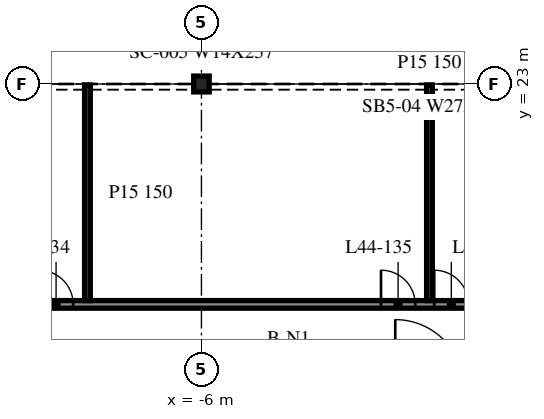
"""IFC4 building model, lengths in metres.
Left out: names, types, materials, properties, quantities, classifications, styles, units other than length and angle.
Written with IfcOpenShell. Run it as: python <this file> out.ifc"""

import sys

from ifc_helpers import new_model, si_unit, direction, frame, frame_2d, origin, origin_2d, place, context, subcontext, project, spatial, rectangle, i_section, extrude, element, fill, save


model = new_model("IFC4")
c1 = context("Model", 3, precision=1e-05, world=origin(), true_north=direction((0.0, 1.0)))
c2 = subcontext(c1, "Body", "Model", "MODEL_VIEW")
j1 = project(units=[si_unit("LENGTHUNIT", "METRE"), si_unit("PLANEANGLEUNIT", "RADIAN")], contexts=[c1])
p1 = place(None, origin())
s1 = spatial("IfcSite", under=j1, at=p1, CompositionType="ELEMENT")
p2 = place(p1, origin())
s2 = spatial("IfcBuilding", under=s1, at=p2, CompositionType="ELEMENT")
p3 = place(p2, frame((0.0, 0.0, 185.8)))
s3 = spatial("IfcBuildingStorey", under=s2, at=p3, CompositionType="ELEMENT", Elevation=185.8)
p4 = place(p3, frame((-6.0, 23.0, -0.34), z_axis=(0.0, 0.0, 1.0), x_axis=(1.0, 0.0, 0.0)))
e1 = element("IfcColumn", 1, at=p4, inside=s3, PredefinedType="COLUMN", context=c2, shape_type="SweptSolid", body=[
    extrude(i_section(OverallWidth=0.406, OverallDepth=0.417, WebThickness=0.03, FlangeThickness=0.048, at=origin_2d()), origin(), (0.0, 0.0, 1.0), 3.74),
])
p5 = place(p3, frame((-47.975, 17.2, 0.0), z_axis=(0.0, 0.0, 1.0), x_axis=(1.0, 0.0, 0.0)))
e2 = element("IfcWall", 2, at=p5, inside=s3, PredefinedType="PARTITIONING", context=c2, shape_type="SweptSolid", body=[
    extrude(rectangle(XDim=95.95, YDim=0.2, at=frame_2d((47.975, 0.0))), origin(), (0.0, 0.0, 1.0), 3.4),
])
p6 = place(p5, frame((7.7, 0.0, 0.0)))
e3 = element("IfcOpeningElement", 3, at=p6, cuts=e2, PredefinedType="OPENING", context=c2, shape_type="SweptSolid", body=[
    extrude(rectangle(XDim=0.9, YDim=2.1, at=frame_2d((0.45, 1.05))), frame((0.0, 0.11, 0.0), z_axis=(0.0, -1.0, 0.0), x_axis=(1.0, 0.0, 0.0)), (0.0, 0.0, 1.0), 0.22),
])
p7 = place(p5, frame((16.7, 0.0, 0.0)))
e4 = element("IfcOpeningElement", 4, at=p7, cuts=e2, PredefinedType="OPENING", context=c2, shape_type="SweptSolid", body=[
    extrude(rectangle(XDim=0.9, YDim=2.1, at=frame_2d((0.45, 1.05))), frame((0.0, 0.11, 0.0), z_axis=(0.0, -1.0, 0.0), x_axis=(1.0, 0.0, 0.0)), (0.0, 0.0, 1.0), 0.22),
])
p8 = place(p5, frame((22.7, 0.0, 0.0)))
e5 = element("IfcOpeningElement", 5, at=p8, cuts=e2, PredefinedType="OPENING", context=c2, shape_type="SweptSolid", body=[
    extrude(rectangle(XDim=0.9, YDim=2.1, at=frame_2d((0.45, 1.05))), frame((0.0, 0.11, 0.0), z_axis=(0.0, -1.0, 0.0), x_axis=(1.0, 0.0, 0.0)), (0.0, 0.0, 1.0), 0.22),
])
p9 = place(p5, frame((26.1, 0.0, 0.0)))
e6 = element("IfcOpeningElement", 6, at=p9, cuts=e2, PredefinedType="OPENING", context=c2, shape_type="SweptSolid", body=[
    extrude(rectangle(XDim=0.9, YDim=2.1, at=frame_2d((0.45, 1.05))), frame((0.0, 0.11, 0.0), z_axis=(0.0, -1.0, 0.0), x_axis=(1.0, 0.0, 0.0)), (0.0, 0.0, 1.0), 0.22),
])
p10 = place(p5, frame((28.7, 0.0, 0.0)))
e7 = element("IfcOpeningElement", 7, at=p10, cuts=e2, PredefinedType="OPENING", context=c2, shape_type="SweptSolid", body=[
    extrude(rectangle(XDim=0.9, YDim=2.1, at=frame_2d((0.45, 1.05))), frame((0.0, 0.11, 0.0), z_axis=(0.0, -1.0, 0.0), x_axis=(1.0, 0.0, 0.0)), (0.0, 0.0, 1.0), 0.22),
])
p11 = place(p5, frame((37.7, 0.0, 0.0)))
e8 = element("IfcOpeningElement", 8, at=p11, cuts=e2, PredefinedType="OPENING", context=c2, shape_type="SweptSolid", body=[
    extrude(rectangle(XDim=0.9, YDim=2.1, at=frame_2d((0.45, 1.05))), frame((0.0, 0.11, 0.0), z_axis=(0.0, -1.0, 0.0), x_axis=(1.0, 0.0, 0.0)), (0.0, 0.0, 1.0), 0.22),
])
p12 = place(p5, frame((46.7, 0.0, 0.0)))
e9 = element("IfcOpeningElement", 9, at=p12, cuts=e2, PredefinedType="OPENING", context=c2, shape_type="SweptSolid", body=[
    extrude(rectangle(XDim=0.9, YDim=2.1, at=frame_2d((0.45, 1.05))), frame((0.0, 0.11, 0.0), z_axis=(0.0, -1.0, 0.0), x_axis=(1.0, 0.0, 0.0)), (0.0, 0.0, 1.0), 0.22),
])
p13 = place(p5, frame((48.1, 0.0, 0.0)))
e10 = element("IfcOpeningElement", 10, at=p13, cuts=e2, PredefinedType="OPENING", context=c2, shape_type="SweptSolid", body=[
    extrude(rectangle(XDim=0.9, YDim=2.1, at=frame_2d((0.45, 1.05))), frame((0.0, 0.11, 0.0), z_axis=(0.0, -1.0, 0.0), x_axis=(1.0, 0.0, 0.0)), (0.0, 0.0, 1.0), 0.22),
])
p14 = place(p5, frame((54.1, 0.0, 0.0)))
e11 = element("IfcOpeningElement", 11, at=p14, cuts=e2, PredefinedType="OPENING", context=c2, shape_type="SweptSolid", body=[
    extrude(rectangle(XDim=0.9, YDim=2.1, at=frame_2d((0.45, 1.05))), frame((0.0, 0.11, 0.0), z_axis=(0.0, -1.0, 0.0), x_axis=(1.0, 0.0, 0.0)), (0.0, 0.0, 1.0), 0.22),
])
p15 = place(p5, frame((57.5, 0.0, 0.0)))
e12 = element("IfcOpeningElement", 12, at=p15, cuts=e2, PredefinedType="OPENING", context=c2, shape_type="SweptSolid", body=[
    extrude(rectangle(XDim=0.9, YDim=2.1, at=frame_2d((0.45, 1.05))), frame((0.0, 0.11, 0.0), z_axis=(0.0, -1.0, 0.0), x_axis=(1.0, 0.0, 0.0)), (0.0, 0.0, 1.0), 0.22),
])
p16 = place(p5, frame((60.1, 0.0, 0.0)))
e13 = element("IfcOpeningElement", 13, at=p16, cuts=e2, PredefinedType="OPENING", context=c2, shape_type="SweptSolid", body=[
    extrude(rectangle(XDim=0.9, YDim=2.1, at=frame_2d((0.45, 1.05))), frame((0.0, 0.11, 0.0), z_axis=(0.0, -1.0, 0.0), x_axis=(1.0, 0.0, 0.0)), (0.0, 0.0, 1.0), 0.22),
])
p17 = place(p5, frame((69.1, 0.0, 0.0)))
e14 = element("IfcOpeningElement", 14, at=p17, cuts=e2, PredefinedType="OPENING", context=c2, shape_type="SweptSolid", body=[
    extrude(rectangle(XDim=0.9, YDim=2.1, at=frame_2d((0.45, 1.05))), frame((0.0, 0.11, 0.0), z_axis=(0.0, -1.0, 0.0), x_axis=(1.0, 0.0, 0.0)), (0.0, 0.0, 1.0), 0.22),
])
p18 = place(p5, frame((78.1, 0.0, 0.0)))
e15 = element("IfcOpeningElement", 15, at=p18, cuts=e2, PredefinedType="OPENING", context=c2, shape_type="SweptSolid", body=[
    extrude(rectangle(XDim=0.9, YDim=2.1, at=frame_2d((0.45, 1.05))), frame((0.0, 0.11, 0.0), z_axis=(0.0, -1.0, 0.0), x_axis=(1.0, 0.0, 0.0)), (0.0, 0.0, 1.0), 0.22),
])
p19 = place(p5, frame((84.1, 0.0, 0.0)))
e16 = element("IfcOpeningElement", 16, at=p19, cuts=e2, PredefinedType="OPENING", context=c2, shape_type="SweptSolid", body=[
    extrude(rectangle(XDim=0.9, YDim=2.1, at=frame_2d((0.45, 1.05))), frame((0.0, 0.11, 0.0), z_axis=(0.0, -1.0, 0.0), x_axis=(1.0, 0.0, 0.0)), (0.0, 0.0, 1.0), 0.22),
])
p20 = place(p5, frame((87.5, 0.0, 0.0)))
e17 = element("IfcOpeningElement", 17, at=p20, cuts=e2, PredefinedType="OPENING", context=c2, shape_type="SweptSolid", body=[
    extrude(rectangle(XDim=0.9, YDim=2.1, at=frame_2d((0.45, 1.05))), frame((0.0, 0.11, 0.0), z_axis=(0.0, -1.0, 0.0), x_axis=(1.0, 0.0, 0.0)), (0.0, 0.0, 1.0), 0.22),
])
p21 = place(p5, frame((90.1, 0.0, 0.0)))
e18 = element("IfcOpeningElement", 18, at=p21, cuts=e2, PredefinedType="OPENING", context=c2, shape_type="SweptSolid", body=[
    extrude(rectangle(XDim=0.9, YDim=2.1, at=frame_2d((0.45, 1.05))), frame((0.0, 0.11, 0.0), z_axis=(0.0, -1.0, 0.0), x_axis=(1.0, 0.0, 0.0)), (0.0, 0.0, 1.0), 0.22),
])
for number, where, z_axis, x_axis in (
    (19, (-9.0, 17.3, 0.0), (0.0, 0.0, 1.0), (0.0, 1.0, 0.0)),
    (20, (0.0, 17.3, 0.0), (0.0, 0.0, 1.0), (0.0, 1.0, 0.0)),
):
    element("IfcWall", number, at=place(p3, frame(where, z_axis=z_axis, x_axis=x_axis)), inside=s3, PredefinedType="PARTITIONING", context=c2, shape_type="SweptSolid", body=[
        extrude(rectangle(XDim=5.675, YDim=0.15, at=frame_2d((2.837, 0.0))), origin(), (0.0, 0.0, 1.0), 3.4),
    ])
p22 = place(p11, origin())
e21 = element("IfcDoor", 21, at=p22, inside=s3, OperationType="SINGLE_SWING_LEFT", PredefinedType="DOOR", context=c2, shape_type="SweptSolid", body=[
    extrude(rectangle(XDim=0.9, YDim=2.1, at=frame_2d((0.45, 1.05))), frame((0.0, 0.025, 0.0), z_axis=(0.0, -1.0, 0.0), x_axis=(1.0, 0.0, 0.0)), (0.0, 0.0, 1.0), 0.05),
])
fill(e8, e21)
p23 = place(p12, origin())
e22 = element("IfcDoor", 22, at=p23, inside=s3, OperationType="SINGLE_SWING_LEFT", PredefinedType="DOOR", context=c2, shape_type="SweptSolid", body=[
    extrude(rectangle(XDim=0.9, YDim=2.1, at=frame_2d((0.45, 1.05))), frame((0.0, 0.025, 0.0), z_axis=(0.0, -1.0, 0.0), x_axis=(1.0, 0.0, 0.0)), (0.0, 0.0, 1.0), 0.05),
])
fill(e9, e22)
p24 = place(p13, origin())
e23 = element("IfcDoor", 23, at=p24, inside=s3, OperationType="SINGLE_SWING_RIGHT", PredefinedType="DOOR", context=c2, shape_type="SweptSolid", body=[
    extrude(rectangle(XDim=0.9, YDim=2.1, at=frame_2d((0.45, 1.05))), frame((0.0, 0.025, 0.0), z_axis=(0.0, -1.0, 0.0), x_axis=(1.0, 0.0, 0.0)), (0.0, 0.0, 1.0), 0.05),
])
fill(e10, e23)
save(model, sys.argv[1])
